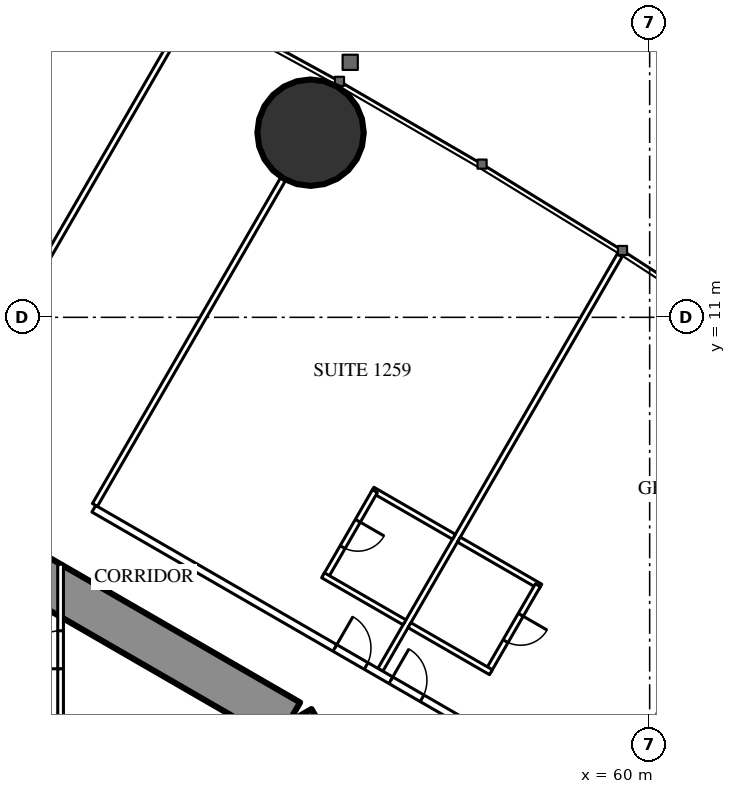
"""IFC4 building model, lengths in metres.
Left out: names, types, materials, properties, quantities, classifications, styles, units other than length and angle.
Written with IfcOpenShell. Run it as: python <this file> out.ifc"""

import sys

from ifc_helpers import new_model, si_unit, direction, frame, frame_2d, origin, origin_2d, place, context, subcontext, project, spatial, rectangle, hollow_circle, extrude, element, fill, save


model = new_model("IFC4")
c1 = context("Model", 3, precision=1e-05, world=origin(), true_north=direction((0.0, 1.0)))
c2 = subcontext(c1, "Body", "Model", "MODEL_VIEW")
j1 = project(units=[si_unit("LENGTHUNIT", "METRE"), si_unit("PLANEANGLEUNIT", "RADIAN")], contexts=[c1])
p1 = place(None, origin())
s1 = spatial("IfcSite", under=j1, at=p1, CompositionType="ELEMENT")
p2 = place(p1, origin())
s2 = spatial("IfcBuilding", under=s1, at=p2, CompositionType="ELEMENT")
p3 = place(p2, frame((0.0, 0.0, 49.5)))
s3 = spatial("IfcBuildingStorey", under=s2, at=p3, CompositionType="ELEMENT", Elevation=49.5)
p4 = place(p3, frame((51.078, 15.858, 0.0), z_axis=(0.0, 0.0, 1.0), x_axis=(1.0, 0.0, 0.0)))
e1 = element("IfcColumn", 1, at=p4, inside=s3, PredefinedType="COLUMN", context=c2, shape_type="SweptSolid", body=[
    extrude(hollow_circle(Radius=1.4, WallThickness=0.12, at=origin_2d()), origin(), (0.0, 0.0, 1.0), 3.5),
])
p5 = place(p3, frame((61.5, 0.0, 0.0), z_axis=(0.0, 0.0, 1.0), x_axis=(1.0, 0.0, 0.0)))
e2 = element("IfcColumn", 2, at=p5, inside=s3, PredefinedType="COLUMN", context=c2, shape_type="SweptSolid", body=[
    extrude(hollow_circle(Radius=1.4, WallThickness=0.1, at=origin_2d()), origin(), (0.0, 0.0, 1.0), 3.5),
])
p6 = place(p3, frame((27.2, -13.8, 0.0), z_axis=(0.0, 0.0, 1.0), x_axis=(0.866027159892, 0.499996958321, 0.0)))
e3 = element("IfcWall", 3, at=p6, inside=s3, PredefinedType="SHEAR", context=c2, shape_type="SweptSolid", body=[
    extrude(rectangle(XDim=27.947, YDim=1.2, at=frame_2d((13.973, 0.0))), origin(), (0.0, 0.0, 1.0), 3.5),
])
p7 = place(p6, frame((4.6, 0.0, 0.0)))
e4 = element("IfcOpeningElement", 4, at=p7, cuts=e3, PredefinedType="OPENING", context=c2, shape_type="SweptSolid", body=[
    extrude(rectangle(XDim=1.0, YDim=2.2, at=frame_2d((0.5, 1.1))), frame((0.0, 0.61, 0.0), z_axis=(0.0, -1.0, 0.0), x_axis=(1.0, 0.0, 0.0)), (0.0, 0.0, 1.0), 1.22),
])
p8 = place(p6, frame((13.395, 0.0, 0.0)))
e5 = element("IfcOpeningElement", 5, at=p8, cuts=e3, PredefinedType="OPENING", context=c2, shape_type="SweptSolid", body=[
    extrude(rectangle(XDim=1.8, YDim=2.2, at=frame_2d((0.9, 1.1))), frame((0.0, 0.61, 0.0), z_axis=(0.0, -1.0, 0.0), x_axis=(1.0, 0.0, 0.0)), (0.0, 0.0, 1.0), 1.22),
])
p9 = place(p3, frame((27.2, 13.8, 0.0), z_axis=(0.0, 0.0, 1.0), x_axis=(0.866024515034, -0.500001539357, 0.0)))
e6 = element("IfcWall", 6, at=p9, inside=s3, PredefinedType="SHEAR", context=c2, shape_type="SweptSolid", body=[
    extrude(rectangle(XDim=26.907, YDim=1.2, at=frame_2d((13.454, 0.0))), origin(), (0.0, 0.0, 1.0), 3.5),
])
p10 = place(p9, frame((4.6, 0.0, 0.0)))
e7 = element("IfcOpeningElement", 7, at=p10, cuts=e6, PredefinedType="OPENING", context=c2, shape_type="SweptSolid", body=[
    extrude(rectangle(XDim=1.0, YDim=2.2, at=frame_2d((0.5, 1.1))), frame((0.0, 0.61, 0.0), z_axis=(0.0, -1.0, 0.0), x_axis=(1.0, 0.0, 0.0)), (0.0, 0.0, 1.0), 1.22),
])
p11 = place(p9, frame((13.395, 0.0, 0.0)))
e8 = element("IfcOpeningElement", 8, at=p11, cuts=e6, PredefinedType="OPENING", context=c2, shape_type="SweptSolid", body=[
    extrude(rectangle(XDim=1.8, YDim=2.2, at=frame_2d((0.9, 1.1))), frame((0.0, 0.61, 0.0), z_axis=(0.0, -1.0, 0.0), x_axis=(1.0, 0.0, 0.0)), (0.0, 0.0, 1.0), 1.22),
])
p12 = place(p3, frame((41.647, 8.23, 0.0), z_axis=(0.0, 0.0, 1.0), x_axis=(0.49998590462, 0.866033541603, 0.0)))
e9 = element("IfcWall", 9, at=p12, inside=s3, PredefinedType="PARTITIONING", context=c2, shape_type="SweptSolid", body=[
    extrude(rectangle(XDim=12.621, YDim=0.15, at=frame_2d((6.311, 0.0))), origin(), (0.0, 0.0, 1.0), 3.25),
])
p13 = place(p3, frame((45.403, 6.062, 0.0), z_axis=(0.0, 0.0, 1.0), x_axis=(0.500013434677, 0.866017647131, 0.0)))
e10 = element("IfcWall", 10, at=p13, inside=s3, PredefinedType="PARTITIONING", context=c2, shape_type="SweptSolid", body=[
    extrude(rectangle(XDim=9.902, YDim=0.15, at=frame_2d((4.951, 0.0))), origin(), (0.0, 0.0, 1.0), 2.25),
])
p14 = place(p3, frame((52.915, 1.725, 0.0), z_axis=(0.0, 0.0, 1.0), x_axis=(0.499997163113, 0.866027041656, 0.0)))
e11 = element("IfcWall", 11, at=p14, inside=s3, PredefinedType="PARTITIONING", context=c2, shape_type="SweptSolid", body=[
    extrude(rectangle(XDim=12.591, YDim=0.15, at=frame_2d((6.295, 0.0))), origin(), (0.0, 0.0, 1.0), 3.25),
])
p15 = place(p3, frame((45.375, 5.963, 0.0), z_axis=(0.0, 0.0, 1.0), x_axis=(0.86603164725, -0.499989185844, 0.0)))
e12 = element("IfcWall", 12, at=p15, inside=s3, PredefinedType="PARTITIONING", context=c2, shape_type="SweptSolid", body=[
    extrude(rectangle(XDim=11.805, YDim=0.2, at=frame_2d((5.903, 0.0))), origin(), (0.0, 0.0, 1.0), 3.25),
])
p16 = place(p15, frame((9.024, 0.0, 0.0)))
e13 = element("IfcOpeningElement", 13, at=p16, cuts=e12, PredefinedType="OPENING", context=c2, shape_type="SweptSolid", body=[
    extrude(rectangle(XDim=0.95, YDim=2.2, at=frame_2d((0.475, 1.1))), frame((0.0, 0.11, 0.0), z_axis=(0.0, -1.0, 0.0), x_axis=(1.0, 0.0, 0.0)), (0.0, 0.0, 1.0), 0.22),
])
p17 = place(p15, frame((7.324, 0.0, 0.0)))
e14 = element("IfcOpeningElement", 14, at=p17, cuts=e12, PredefinedType="OPENING", context=c2, shape_type="SweptSolid", body=[
    extrude(rectangle(XDim=0.95, YDim=2.2, at=frame_2d((0.475, 1.1))), frame((0.0, 0.11, 0.0), z_axis=(0.0, -1.0, 0.0), x_axis=(1.0, 0.0, 0.0)), (0.0, 0.0, 1.0), 0.22),
])
p18 = place(p3, frame((54.98, 5.151, 0.0), z_axis=(0.0, 0.0, 1.0), x_axis=(0.86604923931, -0.499958713387, 0.0)))
e15 = element("IfcWall", 15, at=p18, inside=s3, PredefinedType="PARTITIONING", context=c2, shape_type="SweptSolid", body=[
    extrude(rectangle(XDim=2.475, YDim=0.15, at=frame_2d((1.237, 0.0))), origin(), (0.0, 0.0, 1.0), 3.25),
])
p19 = place(p3, frame((55.758, 1.7, 0.0), z_axis=(0.0, 0.0, 1.0), x_axis=(0.500006934395, 0.866021400173, 0.0)))
e16 = element("IfcWall", 16, at=p19, inside=s3, PredefinedType="PARTITIONING", context=c2, shape_type="SweptSolid", body=[
    extrude(rectangle(XDim=2.6, YDim=0.15, at=frame_2d((1.3, 0.0))), origin(), (0.0, 0.0, 1.0), 3.25),
])
p20 = place(p19, frame((0.9, 0.0, 0.0)))
e17 = element("IfcOpeningElement", 17, at=p20, cuts=e16, PredefinedType="OPENING", context=c2, shape_type="SweptSolid", body=[
    extrude(rectangle(XDim=0.8, YDim=2.2, at=frame_2d((0.4, 1.1))), frame((0.0, 0.085, 0.0), z_axis=(0.0, -1.0, 0.0), x_axis=(1.0, 0.0, 0.0)), (0.0, 0.0, 1.0), 0.17),
])
for number, where, z_axis, x_axis in (
    (18, (53.68, 2.9, 0.0), (0.0, 0.0, 1.0), (0.866, -0.5, 0.0)),
    (19, (52.706, 6.464, 0.0), (0.0, 0.0, 1.0), (0.866, -0.5, 0.0)),
):
    element("IfcWall", number, at=place(p3, frame(where, z_axis=z_axis, x_axis=x_axis)), inside=s3, PredefinedType="PARTITIONING", context=c2, shape_type="SweptSolid", body=[
        extrude(rectangle(XDim=2.475, YDim=0.15, at=frame_2d((1.237, 0.0))), origin(), (0.0, 0.0, 1.0), 3.25),
    ])
p21 = place(p3, frame((51.471, 4.175, 0.0), z_axis=(0.0, 0.0, 1.0), x_axis=(0.500006934395, 0.866021400173, 0.0)))
e20 = element("IfcWall", 20, at=p21, inside=s3, PredefinedType="PARTITIONING", context=c2, shape_type="SweptSolid", body=[
    extrude(rectangle(XDim=2.6, YDim=0.15, at=frame_2d((1.3, 0.0))), origin(), (0.0, 0.0, 1.0), 3.25),
])
p22 = place(p21, frame((0.9, 0.0, 0.0)))
e21 = element("IfcOpeningElement", 21, at=p22, cuts=e20, PredefinedType="OPENING", context=c2, shape_type="SweptSolid", body=[
    extrude(rectangle(XDim=0.8, YDim=2.2, at=frame_2d((0.4, 1.1))), frame((0.0, 0.085, 0.0), z_axis=(0.0, -1.0, 0.0), x_axis=(1.0, 0.0, 0.0)), (0.0, 0.0, 1.0), 0.17),
])
p23 = place(p3, frame((51.406, 4.212, 0.0), z_axis=(0.0, 0.0, 1.0), x_axis=(0.866031185235, -0.4999899861, 0.0)))
e22 = element("IfcWall", 22, at=p23, inside=s3, PredefinedType="PARTITIONING", context=c2, shape_type="SweptSolid", body=[
    extrude(rectangle(XDim=2.475, YDim=0.15, at=frame_2d((1.238, 0.0))), origin(), (0.0, 0.0, 1.0), 3.25),
])
p24 = place(p3, frame((44.5, -4.505, 0.0), z_axis=(0.0, 0.0, 1.0), x_axis=(0.0, 1.0, 0.0)))
e23 = element("IfcWall", 23, at=p24, inside=s3, PredefinedType="PARTITIONING", context=c2, shape_type="SweptSolid", body=[
    extrude(rectangle(XDim=9.009, YDim=0.15, at=frame_2d((4.505, 0.0))), origin(), (0.0, 0.0, 1.0), 2.45),
])
p25 = place(p24, frame((1.752, 0.0, 0.0)))
e24 = element("IfcOpeningElement", 24, at=p25, cuts=e23, PredefinedType="OPENING", context=c2, shape_type="SweptSolid", body=[
    extrude(rectangle(XDim=1.0, YDim=2.2, at=frame_2d((0.5, 1.1))), frame((0.0, 0.085, 0.0), z_axis=(0.0, -1.0, 0.0), x_axis=(1.0, 0.0, 0.0)), (0.0, 0.0, 1.0), 0.17),
])
p26 = place(p24, frame((6.257, 0.0, 0.0)))
e25 = element("IfcOpeningElement", 25, at=p26, cuts=e23, PredefinedType="OPENING", context=c2, shape_type="SweptSolid", body=[
    extrude(rectangle(XDim=1.0, YDim=2.2, at=frame_2d((0.5, 1.1))), frame((0.0, 0.085, 0.0), z_axis=(0.0, -1.0, 0.0), x_axis=(1.0, 0.0, 0.0)), (0.0, 0.0, 1.0), 0.17),
])
p27 = place(p20, origin())
e26 = element("IfcDoor", 26, at=p27, inside=s3, OperationType="SINGLE_SWING_RIGHT", PredefinedType="DOOR", context=c2, shape_type="SweptSolid", body=[
    extrude(rectangle(XDim=0.8, YDim=2.2, at=frame_2d((0.4, 1.1))), frame((0.0, 0.025, 0.0), z_axis=(0.0, -1.0, 0.0), x_axis=(1.0, 0.0, 0.0)), (0.0, 0.0, 1.0), 0.05),
])
fill(e17, e26)
p28 = place(p16, origin())
e27 = element("IfcDoor", 27, at=p28, inside=s3, OperationType="SINGLE_SWING_LEFT", PredefinedType="DOOR", context=c2, shape_type="SweptSolid", body=[
    extrude(rectangle(XDim=0.95, YDim=2.2, at=frame_2d((0.475, 1.1))), frame((0.0, 0.025, 0.0), z_axis=(0.0, -1.0, 0.0), x_axis=(1.0, 0.0, 0.0)), (0.0, 0.0, 1.0), 0.05),
])
fill(e13, e27)
p29 = place(p22, origin())
e28 = element("IfcDoor", 28, at=p29, inside=s3, OperationType="SINGLE_SWING_RIGHT", PredefinedType="DOOR", context=c2, shape_type="SweptSolid", body=[
    extrude(rectangle(XDim=0.8, YDim=2.2, at=frame_2d((0.4, 1.1))), frame((0.0, 0.025, 0.0), z_axis=(0.0, -1.0, 0.0), x_axis=(1.0, 0.0, 0.0)), (0.0, 0.0, 1.0), 0.05),
])
fill(e21, e28)
p30 = place(p17, origin())
e29 = element("IfcDoor", 29, at=p30, inside=s3, OperationType="SINGLE_SWING_LEFT", PredefinedType="DOOR", context=c2, shape_type="SweptSolid", body=[
    extrude(rectangle(XDim=0.95, YDim=2.2, at=frame_2d((0.475, 1.1))), frame((0.0, 0.025, 0.0), z_axis=(0.0, -1.0, 0.0), x_axis=(1.0, 0.0, 0.0)), (0.0, 0.0, 1.0), 0.05),
])
fill(e14, e29)
p31 = place(p26, origin())
e30 = element("IfcDoor", 30, at=p31, inside=s3, OperationType="SINGLE_SWING_LEFT", PredefinedType="DOOR", context=c2, shape_type="SweptSolid", body=[
    extrude(rectangle(XDim=1.0, YDim=2.2, at=frame_2d((0.5, 1.1))), frame((0.0, 0.025, 0.0), z_axis=(0.0, -1.0, 0.0), x_axis=(1.0, 0.0, 0.0)), (0.0, 0.0, 1.0), 0.05),
])
fill(e25, e30)
save(model, sys.argv[1])
